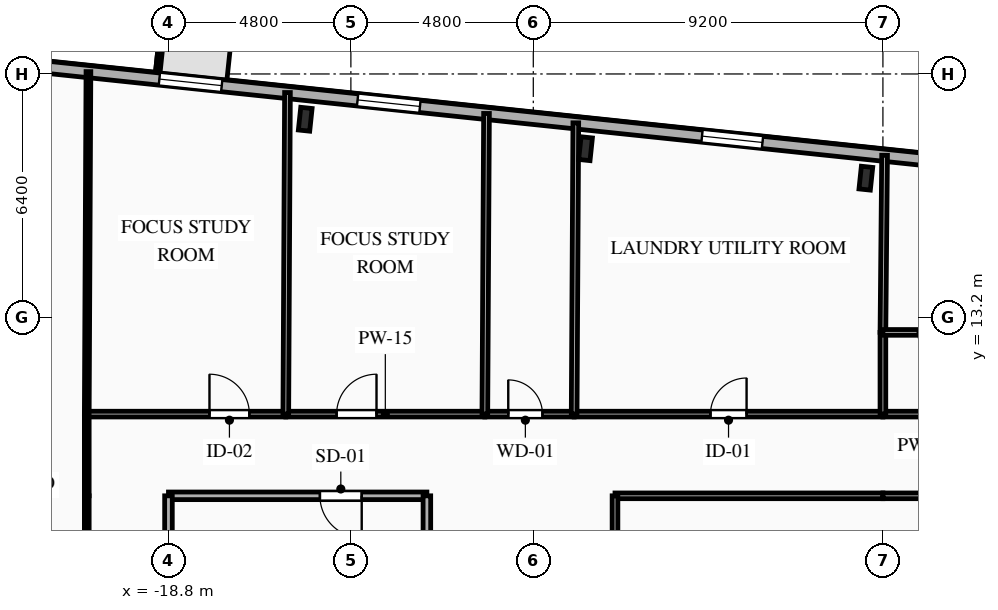
"""IFC4 building model, lengths in metres.
Left out: names, types, materials, properties, quantities, classifications, styles, units other than length and angle.
Written with IfcOpenShell. Run it as: python <this file> out.ifc"""

import sys

from ifc_helpers import new_model, si_unit, direction, frame, frame_2d, origin, origin_2d, place, context, subcontext, project, spatial, rectangle, i_section, extrude, element, fill, save


model = new_model("IFC4")
c1 = context("Model", 3, precision=1e-05, world=origin(), true_north=direction((0.0, 1.0)))
c2 = subcontext(c1, "Body", "Model", "MODEL_VIEW")
j1 = project(units=[si_unit("LENGTHUNIT", "METRE"), si_unit("PLANEANGLEUNIT", "RADIAN")], contexts=[c1])
p1 = place(None, origin())
s1 = spatial("IfcSite", under=j1, at=p1, CompositionType="ELEMENT")
p2 = place(p1, origin())
s2 = spatial("IfcBuilding", under=s1, at=p2, CompositionType="ELEMENT")
p3 = place(p2, frame((0.0, 0.0, 196.4)))
s3 = spatial("IfcBuildingStorey", under=s2, at=p3, CompositionType="ELEMENT", Elevation=196.4)
for number, where, z_axis, x_axis in (
    (1, (-0.449, 16.858, 0.0), (0.0, 0.0, 1.0), (0.995, -0.105, 0.0)),
    (2, (-7.825, 17.634, 0.0), (0.0, 0.0, 1.0), (0.995, -0.105, 0.0)),
    (3, (-15.201, 18.409, 0.0), (0.0, 0.0, 1.0), (0.995, -0.105, 0.0)),
):
    element("IfcColumn", number, at=place(p3, frame(where, z_axis=z_axis, x_axis=x_axis)), inside=s3, PredefinedType="COLUMN", context=c2, shape_type="SweptSolid", body=[
        extrude(i_section(OverallWidth=0.3, OverallDepth=0.6, WebThickness=0.015, FlangeThickness=0.03, FilletRadius=0.027, at=origin_2d()), origin(), (0.0, 0.0, 1.0), 3.35),
    ])
p4 = place(p3, frame((-23.156, 19.898, 0.0), z_axis=(0.0, 0.0, 1.0), x_axis=(0.994522001802, -0.104527450613, 0.0)))
e4 = element("IfcWall", 4, at=p4, inside=s3, PredefinedType="SOLIDWALL", context=c2, shape_type="SweptSolid", body=[
    extrude(rectangle(XDim=45.8, YDim=0.32, at=frame_2d((22.9, 0.0))), origin(), (0.0, 0.0, 1.0), 3.04),
])
p5 = place(p4, frame((4.139, 0.0, 0.85)))
e5 = element("IfcOpeningElement", 5, at=p5, cuts=e4, PredefinedType="OPENING", context=c2, shape_type="SweptSolid", body=[
    extrude(rectangle(XDim=1.65, YDim=1.85, at=frame_2d((0.825, 0.925))), frame((0.0, 0.17, 0.0), z_axis=(0.0, -1.0, 0.0), x_axis=(1.0, 0.0, 0.0)), (0.0, 0.0, 1.0), 0.34),
])
p6 = place(p4, frame((9.384, 0.0, 0.85)))
e6 = element("IfcOpeningElement", 6, at=p6, cuts=e4, PredefinedType="OPENING", context=c2, shape_type="SweptSolid", body=[
    extrude(rectangle(XDim=1.65, YDim=1.85, at=frame_2d((0.825, 0.925))), frame((0.0, 0.17, 0.0), z_axis=(0.0, -1.0, 0.0), x_axis=(1.0, 0.0, 0.0)), (0.0, 0.0, 1.0), 0.34),
])
p7 = place(p4, frame((18.497, 0.0, 0.85)))
e7 = element("IfcOpeningElement", 7, at=p7, cuts=e4, PredefinedType="OPENING", context=c2, shape_type="SweptSolid", body=[
    extrude(rectangle(XDim=1.6, YDim=1.85, at=frame_2d((0.8, 0.925))), frame((0.0, 0.17, 0.0), z_axis=(0.0, -1.0, 0.0), x_axis=(1.0, 0.0, 0.0)), (0.0, 0.0, 1.0), 0.34),
])
p8 = place(p4, frame((27.525, 0.0, 0.85)))
e8 = element("IfcOpeningElement", 8, at=p8, cuts=e4, PredefinedType="OPENING", context=c2, shape_type="SweptSolid", body=[
    extrude(rectangle(XDim=2.2, YDim=1.85, at=frame_2d((1.1, 0.925))), frame((0.0, 0.17, 0.0), z_axis=(0.0, -1.0, 0.0), x_axis=(1.0, 0.0, 0.0)), (0.0, 0.0, 1.0), 0.34),
])
p9 = place(p4, frame((38.329, 0.0, 0.85)))
e9 = element("IfcOpeningElement", 9, at=p9, cuts=e4, PredefinedType="OPENING", context=c2, shape_type="SweptSolid", body=[
    extrude(rectangle(XDim=1.65, YDim=1.85, at=frame_2d((0.825, 0.925))), frame((0.0, 0.17, 0.0), z_axis=(0.0, -1.0, 0.0), x_axis=(1.0, 0.0, 0.0)), (0.0, 0.0, 1.0), 0.34),
])
p10 = place(p3, frame((-12.0, 8.5, 0.0), z_axis=(0.0, 0.0, 1.0), x_axis=(-1.0, 0.0, 0.0)))
e10 = element("IfcWall", 10, at=p10, inside=s3, PredefinedType="PARTITIONING", context=c2, shape_type="SweptSolid", body=[
    extrude(rectangle(XDim=6.8, YDim=0.2, at=frame_2d((3.4, 0.0))), origin(), (0.0, 0.0, 1.0), 3.04),
])
p11 = place(p10, frame((1.715, 0.0, 0.0)))
e11 = element("IfcOpeningElement", 11, at=p11, cuts=e10, PredefinedType="OPENING", context=c2, shape_type="SweptSolid", body=[
    extrude(rectangle(XDim=1.1, YDim=2.15, at=frame_2d((0.55, 1.075))), frame((0.0, 0.11, 0.0), z_axis=(0.0, -1.0, 0.0), x_axis=(1.0, 0.0, 0.0)), (0.0, 0.0, 1.0), 0.22),
])
p12 = place(p3, frame((-18.8, 8.5, 0.0), z_axis=(0.0, 0.0, 1.0), x_axis=(0.0, -1.0, 0.0)))
e12 = element("IfcWall", 12, at=p12, inside=s3, PredefinedType="PARTITIONING", context=c2, shape_type="SweptSolid", body=[
    extrude(rectangle(XDim=2.9, YDim=0.2, at=frame_2d((1.45, 0.0))), origin(), (0.0, 0.0, 1.0), 2.665),
])
p13 = place(p3, frame((-12.0, 5.6, 0.0), z_axis=(0.0, 0.0, 1.0), x_axis=(0.0, 1.0, 0.0)))
e13 = element("IfcWall", 13, at=p13, inside=s3, PredefinedType="PARTITIONING", context=c2, shape_type="SweptSolid", body=[
    extrude(rectangle(XDim=2.9, YDim=0.2, at=frame_2d((1.45, 0.0))), origin(), (0.0, 0.0, 1.0), 3.04),
])
p14 = place(p3, frame((-20.95, 8.5, 0.0), z_axis=(0.0, 0.0, 1.0), x_axis=(0.0, 1.0, 0.0)))
e14 = element("IfcWall", 14, at=p14, inside=s3, PredefinedType="PARTITIONING", context=c2, shape_type="SweptSolid", body=[
    extrude(rectangle(XDim=2.15, YDim=0.125, at=frame_2d((1.075, 0.0))), origin(), (0.0, 0.0, 1.0), 3.04),
])
p15 = place(p3, frame((-20.95, 10.65, 0.0), z_axis=(0.0, 0.0, 1.0), x_axis=(1.0, 0.0, 0.0)))
e15 = element("IfcWall", 15, at=p15, inside=s3, PredefinedType="PARTITIONING", context=c2, shape_type="SweptSolid", body=[
    extrude(rectangle(XDim=5.238, YDim=0.15, at=frame_2d((2.619, 0.0))), origin(), (0.0, 0.0, 1.0), 3.04),
])
p16 = place(p15, frame((3.229, 0.0, 0.0)))
e16 = element("IfcOpeningElement", 16, at=p16, cuts=e15, PredefinedType="OPENING", context=c2, shape_type="SweptSolid", body=[
    extrude(rectangle(XDim=1.05, YDim=2.15, at=frame_2d((0.525, 1.075))), frame((0.0, 0.085, 0.0), z_axis=(0.0, -1.0, 0.0), x_axis=(1.0, 0.0, 0.0)), (0.0, 0.0, 1.0), 0.17),
])
p17 = place(p3, frame((-15.712, 10.65, 0.0), z_axis=(0.0, 0.0, 1.0), x_axis=(1.0, 0.0, 0.0)))
e17 = element("IfcWall", 17, at=p17, inside=s3, PredefinedType="PARTITIONING", context=c2, shape_type="SweptSolid", body=[
    extrude(rectangle(XDim=5.237, YDim=0.15, at=frame_2d((2.619, 0.0))), origin(), (0.0, 0.0, 1.0), 3.04),
])
p18 = place(p17, frame((1.337, 0.0, 0.0)))
e18 = element("IfcOpeningElement", 18, at=p18, cuts=e17, PredefinedType="OPENING", context=c2, shape_type="SweptSolid", body=[
    extrude(rectangle(XDim=1.05, YDim=2.15, at=frame_2d((0.525, 1.075))), frame((0.0, 0.085, 0.0), z_axis=(0.0, -1.0, 0.0), x_axis=(1.0, 0.0, 0.0)), (0.0, 0.0, 1.0), 0.17),
])
p19 = place(p3, frame((-10.475, 10.65, 0.0), z_axis=(0.0, 0.0, 1.0), x_axis=(1.0, 0.0, 0.0)))
e19 = element("IfcWall", 19, at=p19, inside=s3, PredefinedType="PLUMBINGWALL", context=c2, shape_type="SweptSolid", body=[
    extrude(rectangle(XDim=2.35, YDim=0.15, at=frame_2d((1.175, 0.0))), origin(), (0.0, 0.0, 1.0), 3.04),
])
p20 = place(p19, frame((0.616, 0.0, 0.0)))
e20 = element("IfcOpeningElement", 20, at=p20, cuts=e19, PredefinedType="OPENING", context=c2, shape_type="SweptSolid", body=[
    extrude(rectangle(XDim=0.9, YDim=2.1, at=frame_2d((0.45, 1.05))), frame((0.0, 0.085, 0.0), z_axis=(0.0, -1.0, 0.0), x_axis=(1.0, 0.0, 0.0)), (0.0, 0.0, 1.0), 0.17),
])
p21 = place(p3, frame((-8.125, 10.65, 0.0), z_axis=(0.0, 0.0, 1.0), x_axis=(1.0, 0.0, 0.0)))
e21 = element("IfcWall", 21, at=p21, inside=s3, PredefinedType="PARTITIONING", context=c2, shape_type="SweptSolid", body=[
    extrude(rectangle(XDim=8.125, YDim=0.15, at=frame_2d((4.062, 0.0))), origin(), (0.0, 0.0, 1.0), 3.04),
])
p22 = place(p21, frame((3.587, 0.0, 0.0)))
e22 = element("IfcOpeningElement", 22, at=p22, cuts=e21, PredefinedType="OPENING", context=c2, shape_type="SweptSolid", body=[
    extrude(rectangle(XDim=0.95, YDim=2.1, at=frame_2d((0.475, 1.05))), frame((0.0, 0.085, 0.0), z_axis=(0.0, -1.0, 0.0), x_axis=(1.0, 0.0, 0.0)), (0.0, 0.0, 1.0), 0.17),
])
p23 = place(p3, frame((0.0, 8.5, 0.0), z_axis=(0.0, 0.0, 1.0), x_axis=(-1.0, 0.0, 0.0)))
e23 = element("IfcWall", 23, at=p23, inside=s3, PredefinedType="PARTITIONING", context=c2, shape_type="SweptSolid", body=[
    extrude(rectangle(XDim=7.05, YDim=0.15, at=frame_2d((3.525, 0.0))), origin(), (0.0, 0.0, 1.0), 3.04),
])
p24 = place(p3, frame((0.0, 10.65, 0.0), z_axis=(0.0, 0.0, 1.0), x_axis=(1.0, 0.0, 0.0)))
e24 = element("IfcWall", 24, at=p24, inside=s3, PredefinedType="PLUMBINGWALL", context=c2, shape_type="SweptSolid", body=[
    extrude(rectangle(XDim=2.45, YDim=0.15, at=frame_2d((1.225, 0.0))), origin(), (0.0, 0.0, 1.0), 3.04),
])
p25 = place(p3, frame((7.05, 8.5, 0.0), z_axis=(0.0, 0.0, 1.0), x_axis=(-1.0, 0.0, 0.0)))
e25 = element("IfcWall", 25, at=p25, inside=s3, PredefinedType="PARTITIONING", context=c2, shape_type="SweptSolid", body=[
    extrude(rectangle(XDim=7.05, YDim=0.15, at=frame_2d((3.525, 0.0))), origin(), (0.0, 0.0, 1.0), 3.04),
])
p26 = place(p3, frame((-20.95, 2.267, 0.0), z_axis=(0.0, 0.0, 1.0), x_axis=(0.0, 1.0, 0.0)))
e26 = element("IfcWall", 26, at=p26, inside=s3, PredefinedType="PARTITIONING", context=c2, shape_type="SweptSolid", body=[
    extrude(rectangle(XDim=6.233, YDim=0.125, at=frame_2d((3.116, 0.0))), origin(), (0.0, 0.0, 1.0), 3.04),
])
p27 = place(p26, frame((1.095, 0.0, 0.0)))
e27 = element("IfcOpeningElement", 27, at=p27, cuts=e26, PredefinedType="OPENING", context=c2, shape_type="SweptSolid", body=[
    extrude(rectangle(XDim=0.95, YDim=2.1, at=frame_2d((0.475, 1.05))), frame((0.0, 0.073, 0.0), z_axis=(0.0, -1.0, 0.0), x_axis=(1.0, 0.0, 0.0)), (0.0, 0.0, 1.0), 0.145),
])
p28 = place(p3, frame((-7.05, 8.5, 0.0), z_axis=(0.0, 0.0, 1.0), x_axis=(0.0, -1.0, 0.0)))
e28 = element("IfcWall", 28, at=p28, inside=s3, PredefinedType="PARTITIONING", context=c2, shape_type="SweptSolid", body=[
    extrude(rectangle(XDim=9.3, YDim=0.15, at=frame_2d((4.65, 0.0))), origin(), (0.0, 0.0, 1.0), 3.04),
])
p29 = place(p3, frame((-20.906, 19.662, 0.0), z_axis=(0.0, 0.0, 1.0), x_axis=(-0.004876272857, -0.999988110911, 0.0)))
e29 = element("IfcWall", 29, at=p29, inside=s3, PredefinedType="PARTITIONING", context=c2, shape_type="SweptSolid", body=[
    extrude(rectangle(XDim=9.012, YDim=0.125, at=frame_2d((4.506, 0.0))), origin(), (0.0, 0.0, 1.0), 2.665),
])
p30 = place(p3, frame((-15.669, 19.112, 0.0), z_axis=(0.0, 0.0, 1.0), x_axis=(-0.005164534834, -0.999986663701, 0.0)))
e30 = element("IfcWall", 30, at=p30, inside=s3, PredefinedType="PARTITIONING", context=c2, shape_type="SweptSolid", body=[
    extrude(rectangle(XDim=8.462, YDim=0.15, at=frame_2d((4.231, 0.0))), origin(), (0.0, 0.0, 1.0), 2.665),
])
p31 = place(p3, frame((-10.431, 18.561, 0.0), z_axis=(0.0, 0.0, 1.0), x_axis=(-0.005554784069, -0.999984572068, 0.0)))
e31 = element("IfcWall", 31, at=p31, inside=s3, PredefinedType="PLUMBINGWALL", context=c2, shape_type="SweptSolid", body=[
    extrude(rectangle(XDim=7.911, YDim=0.15, at=frame_2d((3.956, 0.0))), origin(), (0.0, 0.0, 1.0), 3.04),
])
p32 = place(p3, frame((-8.081, 18.314, 0.0), z_axis=(0.0, 0.0, 1.0), x_axis=(-0.005733850696, -0.999983561343, 0.0)))
e32 = element("IfcWall", 32, at=p32, inside=s3, PredefinedType="PLUMBINGWALL", context=c2, shape_type="SweptSolid", body=[
    extrude(rectangle(XDim=7.664, YDim=0.15, at=frame_2d((3.832, 0.0))), origin(), (0.0, 0.0, 1.0), 2.665),
])
p33 = place(p3, frame((0.044, 17.46, 0.0), z_axis=(0.0, 0.0, 1.0), x_axis=(-0.009430083116, -0.999955535778, 0.0)))
e33 = element("IfcWall", 33, at=p33, inside=s3, PredefinedType="PARTITIONING", context=c2, shape_type="SweptSolid", body=[
    extrude(rectangle(XDim=4.66, YDim=0.15, at=frame_2d((2.33, 0.0))), origin(), (0.0, 0.0, 1.0), 3.04),
])
p34 = place(p3, frame((0.0, 12.8, 0.0), z_axis=(0.0, 0.0, 1.0), x_axis=(0.0, -1.0, 0.0)))
e34 = element("IfcWall", 34, at=p34, inside=s3, PredefinedType="PLUMBINGWALL", context=c2, shape_type="SweptSolid", body=[
    extrude(rectangle(XDim=2.15, YDim=0.15, at=frame_2d((1.075, 0.0))), origin(), (0.0, 0.0, 1.0), 3.04),
])
p35 = place(p3, frame((2.45, 12.8, 0.0), z_axis=(0.0, 0.0, 1.0), x_axis=(-1.0, 0.0, 0.0)))
e35 = element("IfcWall", 35, at=p35, inside=s3, PredefinedType="PLUMBINGWALL", context=c2, shape_type="SweptSolid", body=[
    extrude(rectangle(XDim=2.45, YDim=0.15, at=frame_2d((1.225, 0.0))), origin(), (0.0, 0.0, 1.0), 3.04),
])
p36 = place(p35, frame((0.629, 0.0, 0.0)))
e36 = element("IfcOpeningElement", 36, at=p36, cuts=e35, PredefinedType="OPENING", context=c2, shape_type="SweptSolid", body=[
    extrude(rectangle(XDim=0.9, YDim=2.1, at=frame_2d((0.45, 1.05))), frame((0.0, 0.085, 0.0), z_axis=(0.0, -1.0, 0.0), x_axis=(1.0, 0.0, 0.0)), (0.0, 0.0, 1.0), 0.17),
])
p37 = place(p5, origin())
e37 = element("IfcWindow", 37, at=p37, inside=s3, PartitioningType="SINGLE_PANEL", PredefinedType="WINDOW", context=c2, shape_type="SweptSolid", body=[
    extrude(rectangle(XDim=1.65, YDim=1.85, at=frame_2d((0.825, 0.925))), frame((0.0, 0.03, 0.0), z_axis=(0.0, -1.0, 0.0), x_axis=(1.0, 0.0, 0.0)), (0.0, 0.0, 1.0), 0.06),
])
fill(e5, e37)
p38 = place(p6, origin())
e38 = element("IfcWindow", 38, at=p38, inside=s3, PartitioningType="SINGLE_PANEL", PredefinedType="WINDOW", context=c2, shape_type="SweptSolid", body=[
    extrude(rectangle(XDim=1.65, YDim=1.85, at=frame_2d((0.825, 0.925))), frame((0.0, 0.03, 0.0), z_axis=(0.0, -1.0, 0.0), x_axis=(1.0, 0.0, 0.0)), (0.0, 0.0, 1.0), 0.06),
])
fill(e6, e38)
p39 = place(p7, origin())
e39 = element("IfcWindow", 39, at=p39, inside=s3, PartitioningType="SINGLE_PANEL", PredefinedType="WINDOW", context=c2, shape_type="SweptSolid", body=[
    extrude(rectangle(XDim=1.6, YDim=1.85, at=frame_2d((0.8, 0.925))), frame((0.0, 0.03, 0.0), z_axis=(0.0, -1.0, 0.0), x_axis=(1.0, 0.0, 0.0)), (0.0, 0.0, 1.0), 0.06),
])
fill(e7, e39)
p40 = place(p11, origin())
e40 = element("IfcDoor", 40, at=p40, inside=s3, OperationType="SINGLE_SWING_LEFT", PredefinedType="DOOR", context=c2, shape_type="SweptSolid", body=[
    extrude(rectangle(XDim=1.1, YDim=2.15, at=frame_2d((0.55, 1.075))), frame((0.0, 0.025, 0.0), z_axis=(0.0, -1.0, 0.0), x_axis=(1.0, 0.0, 0.0)), (0.0, 0.0, 1.0), 0.05),
])
fill(e11, e40)
p41 = place(p16, origin())
e41 = element("IfcDoor", 41, at=p41, inside=s3, OperationType="SINGLE_SWING_LEFT", PredefinedType="DOOR", context=c2, shape_type="SweptSolid", body=[
    extrude(rectangle(XDim=1.05, YDim=2.15, at=frame_2d((0.525, 1.075))), frame((0.0, 0.025, 0.0), z_axis=(0.0, -1.0, 0.0), x_axis=(1.0, 0.0, 0.0)), (0.0, 0.0, 1.0), 0.05),
])
fill(e16, e41)
p42 = place(p18, origin())
e42 = element("IfcDoor", 42, at=p42, inside=s3, OperationType="SINGLE_SWING_RIGHT", PredefinedType="DOOR", context=c2, shape_type="SweptSolid", body=[
    extrude(rectangle(XDim=1.05, YDim=2.15, at=frame_2d((0.525, 1.075))), frame((0.0, 0.025, 0.0), z_axis=(0.0, -1.0, 0.0), x_axis=(1.0, 0.0, 0.0)), (0.0, 0.0, 1.0), 0.05),
])
fill(e18, e42)
p43 = place(p20, origin())
e43 = element("IfcDoor", 43, at=p43, inside=s3, OperationType="SINGLE_SWING_LEFT", PredefinedType="DOOR", context=c2, shape_type="SweptSolid", body=[
    extrude(rectangle(XDim=0.9, YDim=2.1, at=frame_2d((0.45, 1.05))), frame((0.0, 0.025, 0.0), z_axis=(0.0, -1.0, 0.0), x_axis=(1.0, 0.0, 0.0)), (0.0, 0.0, 1.0), 0.05),
])
fill(e20, e43)
p44 = place(p22, origin())
e44 = element("IfcDoor", 44, at=p44, inside=s3, OperationType="SINGLE_SWING_RIGHT", PredefinedType="DOOR", context=c2, shape_type="SweptSolid", body=[
    extrude(rectangle(XDim=0.95, YDim=2.1, at=frame_2d((0.475, 1.05))), frame((0.0, 0.025, 0.0), z_axis=(0.0, -1.0, 0.0), x_axis=(1.0, 0.0, 0.0)), (0.0, 0.0, 1.0), 0.05),
])
fill(e22, e44)
p45 = place(p36, origin())
e45 = element("IfcDoor", 45, at=p45, inside=s3, OperationType="SINGLE_SWING_LEFT", PredefinedType="DOOR", context=c2, shape_type="SweptSolid", body=[
    extrude(rectangle(XDim=0.9, YDim=2.1, at=frame_2d((0.45, 1.05))), frame((0.0, 0.025, 0.0), z_axis=(0.0, -1.0, 0.0), x_axis=(1.0, 0.0, 0.0)), (0.0, 0.0, 1.0), 0.05),
])
fill(e36, e45)
save(model, sys.argv[1])
